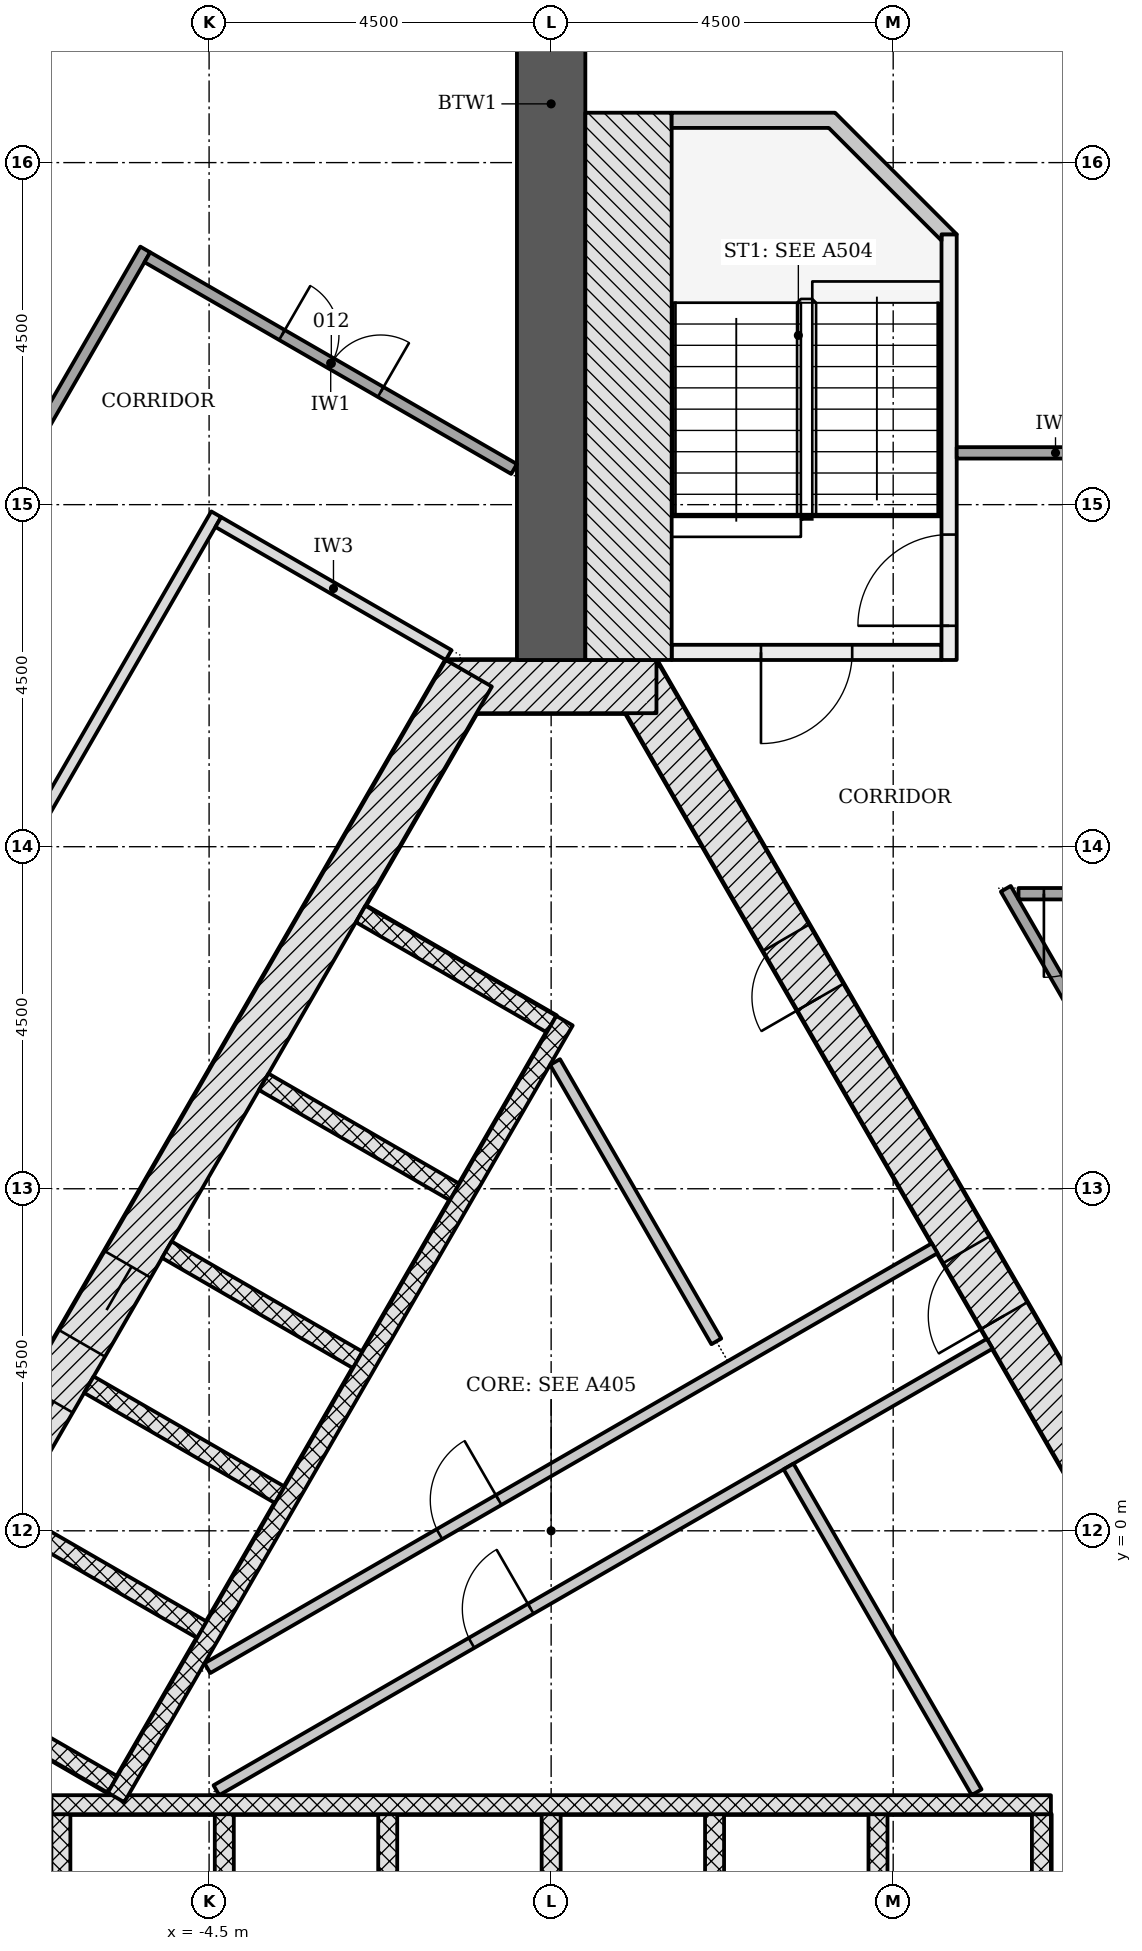
"""IFC4 building model, lengths in metres.
Left out: names, types, materials, properties, quantities, classifications, styles, units other than length and angle.
Written with IfcOpenShell. Run it as: python <this file> out.ifc"""

import sys

from ifc_helpers import new_model, si_unit, direction, frame, frame_2d, origin, place, context, subcontext, project, spatial, polyline, rectangle, outline, extrude, element, fill, save


model = new_model("IFC4")
c1 = context("Model", 3, precision=1e-05, world=origin(), true_north=direction((0.0, 1.0)))
c2 = subcontext(c1, "Body", "Model", "MODEL_VIEW")
j1 = project(units=[si_unit("LENGTHUNIT", "METRE"), si_unit("PLANEANGLEUNIT", "RADIAN")], contexts=[c1])
p1 = place(None, origin())
s1 = spatial("IfcSite", under=j1, at=p1, CompositionType="ELEMENT")
p2 = place(p1, origin())
s2 = spatial("IfcBuilding", under=s1, at=p2, CompositionType="ELEMENT")
p3 = place(p2, frame((0.0, 0.0, 27.6)))
s3 = spatial("IfcBuildingStorey", under=s2, at=p3, CompositionType="ELEMENT", Elevation=27.6)
p4 = place(p3, frame((10.311, -4.703, -0.2), z_axis=(0.0, 0.0, 1.0), x_axis=(-0.500001446645, 0.866024568562, 0.0)))
e1 = element("IfcWall", 1, at=p4, inside=s3, PredefinedType="SHEAR", context=c2, shape_type="SweptSolid", body=[
    extrude(rectangle(XDim=18.458, YDim=0.7, at=frame_2d((9.229, 0.0))), origin(), (0.0, 0.0, 1.0), 3.6),
])
p5 = place(p4, frame((8.7, 0.0, 0.2)))
e2 = element("IfcOpeningElement", 2, at=p5, cuts=e1, PredefinedType="OPENING", context=c2, shape_type="SweptSolid", body=[
    extrude(rectangle(XDim=1.0, YDim=2.1, at=frame_2d((0.5, 1.05))), frame((0.0, 0.36, 0.0), z_axis=(0.0, -1.0, 0.0), x_axis=(1.0, 0.0, 0.0)), (0.0, 0.0, 1.0), 0.72),
])
p6 = place(p4, frame((3.99, 0.0, 0.2)))
e3 = element("IfcOpeningElement", 3, at=p6, cuts=e1, PredefinedType="OPENING", context=c2, shape_type="SweptSolid", body=[
    extrude(rectangle(XDim=0.9, YDim=2.1, at=frame_2d((0.45, 1.05))), frame((0.0, 0.36, 0.0), z_axis=(0.0, -1.0, 0.0), x_axis=(1.0, 0.0, 0.0)), (0.0, 0.0, 1.0), 0.72),
])
p7 = place(p4, frame((13.539, 0.0, 0.2)))
e4 = element("IfcOpeningElement", 4, at=p7, cuts=e1, PredefinedType="OPENING", context=c2, shape_type="SweptSolid", body=[
    extrude(rectangle(XDim=0.9, YDim=2.1, at=frame_2d((0.45, 1.05))), frame((0.0, 0.36, 0.0), z_axis=(0.0, -1.0, 0.0), x_axis=(1.0, 0.0, 0.0)), (0.0, 0.0, 1.0), 0.72),
])
p8 = place(p3, frame((1.386, 11.106, -0.2), z_axis=(0.0, 0.0, 1.0), x_axis=(-1.0, 0.0, 0.0)))
e5 = element("IfcWall", 5, at=p8, inside=s3, PredefinedType="SHEAR", context=c2, shape_type="SweptSolid", body=[
    extrude(rectangle(XDim=2.771, YDim=0.7, at=frame_2d((1.386, 0.0))), origin(), (0.0, 0.0, 1.0), 3.6),
])
p9 = place(p3, frame((-1.083, 11.281, -0.2), z_axis=(0.0, 0.0, 1.0), x_axis=(-0.500001446645, -0.866024568562, 0.0)))
e6 = element("IfcWall", 6, at=p9, inside=s3, PredefinedType="SHEAR", context=c2, shape_type="SweptSolid", body=[
    extrude(rectangle(XDim=18.458, YDim=0.7, at=frame_2d((9.229, 0.0))), origin(), (0.0, 0.0, 1.0), 3.6),
])
p10 = place(p9, frame((8.979, 0.0, 0.2)))
e7 = element("IfcOpeningElement", 7, at=p10, cuts=e6, PredefinedType="OPENING", context=c2, shape_type="SweptSolid", body=[
    extrude(rectangle(XDim=1.2, YDim=2.1, at=frame_2d((0.6, 1.05))), frame((0.0, 0.36, 0.0), z_axis=(0.0, -1.0, 0.0), x_axis=(1.0, 0.0, 0.0)), (0.0, 0.0, 1.0), 0.72),
])
p11 = place(p9, frame((11.029, 0.0, 0.2)))
e8 = element("IfcOpeningElement", 8, at=p11, cuts=e6, PredefinedType="OPENING", context=c2, shape_type="SweptSolid", body=[
    extrude(rectangle(XDim=1.2, YDim=2.1, at=frame_2d((0.6, 1.05))), frame((0.0, 0.36, 0.0), z_axis=(0.0, -1.0, 0.0), x_axis=(1.0, 0.0, 0.0)), (0.0, 0.0, 1.0), 0.72),
])
p12 = place(p3, frame((0.0, 11.456, -0.2), z_axis=(0.0, 0.0, 1.0), x_axis=(0.0, 1.0, 0.0)))
e9 = element("IfcWall", 9, at=p12, inside=s3, PredefinedType="SHEAR", context=c2, shape_type="SweptSolid", body=[
    extrude(rectangle(XDim=14.633, YDim=0.9, at=frame_2d((7.316, 0.0))), origin(), (0.0, 0.0, 1.0), 3.6),
])
for number, where, z_axis, x_axis in (
    (10, (-6.45, -6.228, -0.2), (0.0, 0.0, 1.0), (0.0, 1.0, 0.0)),
    (11, (-4.3, -6.228, -0.2), (0.0, 0.0, 1.0), (0.0, 1.0, 0.0)),
    (12, (-2.15, -6.228, -0.2), (0.0, 0.0, 1.0), (0.0, 1.0, 0.0)),
    (13, (0.0, -6.228, -0.2), (0.0, 0.0, 1.0), (0.0, 1.0, 0.0)),
    (14, (2.15, -6.228, -0.2), (0.0, 0.0, 1.0), (0.0, 1.0, 0.0)),
    (15, (4.3, -6.228, -0.2), (0.0, 0.0, 1.0), (0.0, 1.0, 0.0)),
    (16, (6.45, -6.228, -0.2), (0.0, 0.0, 1.0), (0.0, 1.0, 0.0)),
):
    element("IfcWall", number, at=place(p3, frame(where, z_axis=z_axis, x_axis=x_axis)), inside=s3, PredefinedType="PARTITIONING", context=c2, shape_type="SweptSolid", body=[
        extrude(rectangle(XDim=2.5, YDim=0.25, at=frame_2d((1.25, 0.0))), origin(), (0.0, 0.0, 1.0), 3.6),
    ])
p13 = place(p3, frame((-6.575, -3.603, 0.0), z_axis=(0.0, 0.0, 1.0), x_axis=(1.0, 0.0, 0.0)))
e17 = element("IfcWall", 17, at=p13, inside=s3, PredefinedType="PARTITIONING", context=c2, shape_type="SweptSolid", body=[
    extrude(rectangle(XDim=13.15, YDim=0.25, at=frame_2d((6.575, 0.0))), origin(), (0.0, 0.0, 1.0), 3.4),
])
p14 = place(p3, frame((-2.506, 8.115, -0.2), z_axis=(0.0, 0.0, 1.0), x_axis=(0.865996321171, -0.50005036918, 0.0)))
e18 = element("IfcWall", 18, at=p14, inside=s3, PredefinedType="PARTITIONING", context=c2, shape_type="SweptSolid", body=[
    extrude(rectangle(XDim=2.9, YDim=0.25, at=frame_2d((1.45, 0.0))), origin(), (0.0, 0.0, 1.0), 3.6),
])
for number, where, z_axis, x_axis in (
    (19, (-3.781, 5.907, -0.2), (0.0, 0.0, 1.0), (0.866, -0.5, 0.0)),
    (20, (-5.056, 3.699, -0.2), (0.0, 0.0, 1.0), (0.866, -0.5, 0.0)),
    (21, (-6.081, 1.923, -0.2), (0.0, 0.0, 1.0), (0.866, -0.5, 0.0)),
    (22, (-7.106, 0.148, -0.2), (0.0, 0.0, 1.0), (0.866, -0.5, 0.0)),
    (23, (-8.281, -1.887, -0.2), (0.0, 0.0, 1.0), (0.866, -0.5, 0.0)),
):
    element("IfcWall", number, at=place(p3, frame(where, z_axis=z_axis, x_axis=x_axis)), inside=s3, PredefinedType="PARTITIONING", context=c2, shape_type="SweptSolid", body=[
        extrude(rectangle(XDim=2.9, YDim=0.25, at=frame_2d((1.45, 0.0))), origin(), (0.0, 0.0, 1.0), 3.6),
    ])
p15 = place(p3, frame((0.176, 6.711, 0.0), z_axis=(0.0, 0.0, 1.0), x_axis=(-0.500004227369, -0.866022963098, 0.0)))
e24 = element("IfcWall", 24, at=p15, inside=s3, PredefinedType="PARTITIONING", context=c2, shape_type="SweptSolid", body=[
    extrude(rectangle(XDim=11.8, YDim=0.25, at=frame_2d((5.9, 0.0))), origin(), (0.0, 0.0, 1.0), 3.4),
])
p16 = place(p3, frame((-4.523, -1.807, 0.0), z_axis=(0.0, 0.0, 1.0), x_axis=(0.866030300338, 0.499991518824, 0.0)))
e25 = element("IfcWall", 25, at=p16, inside=s3, PredefinedType="PARTITIONING", context=c2, shape_type="SweptSolid", body=[
    extrude(rectangle(XDim=11.049, YDim=0.15, at=frame_2d((5.524, 0.0))), origin(), (0.0, 0.0, 1.0), 3.4),
])
p17 = place(p16, frame((3.525, 0.0, 0.0)))
e26 = element("IfcOpeningElement", 26, at=p17, cuts=e25, PredefinedType="OPENING", context=c2, shape_type="SweptSolid", body=[
    extrude(rectangle(XDim=0.9, YDim=2.1, at=frame_2d((0.45, 1.05))), frame((0.0, 0.085, 0.0), z_axis=(0.0, -1.0, 0.0), x_axis=(1.0, 0.0, 0.0)), (0.0, 0.0, 1.0), 0.17),
])
p18 = place(p3, frame((-4.404, -3.413, 0.0), z_axis=(0.0, 0.0, 1.0), x_axis=(0.866022252853, 0.500005457533, 0.0)))
e27 = element("IfcWall", 27, at=p18, inside=s3, PredefinedType="PARTITIONING", context=c2, shape_type="SweptSolid", body=[
    extrude(rectangle(XDim=11.749, YDim=0.15, at=frame_2d((5.875, 0.0))), origin(), (0.0, 0.0, 1.0), 3.4),
])
p19 = place(p18, frame((3.875, 0.0, 0.0)))
e28 = element("IfcOpeningElement", 28, at=p19, cuts=e27, PredefinedType="OPENING", context=c2, shape_type="SweptSolid", body=[
    extrude(rectangle(XDim=0.9, YDim=2.1, at=frame_2d((0.45, 1.05))), frame((0.0, 0.085, 0.0), z_axis=(0.0, -1.0, 0.0), x_axis=(1.0, 0.0, 0.0)), (0.0, 0.0, 1.0), 0.17),
])
p20 = place(p3, frame((2.174, 2.492, 0.0), z_axis=(0.0, 0.0, 1.0), x_axis=(-0.499999641798, 0.866025610592, 0.0)))
e29 = element("IfcWall", 29, at=p20, inside=s3, PredefinedType="PARTITIONING", context=c2, shape_type="SweptSolid", body=[
    extrude(rectangle(XDim=4.244, YDim=0.15, at=frame_2d((2.122, 0.0))), origin(), (0.0, 0.0, 1.0), 3.4),
])
p21 = place(p3, frame((5.598, -3.439, 0.0), z_axis=(0.0, 0.0, 1.0), x_axis=(-0.500007155043, 0.866021272779, 0.0)))
e30 = element("IfcWall", 30, at=p21, inside=s3, PredefinedType="PARTITIONING", context=c2, shape_type="SweptSolid", body=[
    extrude(rectangle(XDim=4.949, YDim=0.15, at=frame_2d((2.474, 0.0))), origin(), (0.0, 0.0, 1.0), 3.4),
])
p22 = place(p3, frame((5.135, 11.556, -0.2), z_axis=(0.0, 0.0, 1.0), x_axis=(-1.0, 0.0, 0.0)))
e31 = element("IfcWall", 31, at=p22, inside=s3, PredefinedType="SHEAR", context=c2, shape_type="SweptSolid", body=[
    extrude(rectangle(XDim=3.55, YDim=0.2, at=frame_2d((1.775, 0.0))), origin(), (0.0, 0.0, 1.0), 3.6),
])
p23 = place(p22, frame((1.175, 0.0, 0.2)))
e32 = element("IfcOpeningElement", 32, at=p23, cuts=e31, PredefinedType="OPENING", context=c2, shape_type="SweptSolid", body=[
    extrude(rectangle(XDim=1.2, YDim=2.1, at=frame_2d((0.6, 1.05))), frame((0.0, 0.11, 0.0), z_axis=(0.0, -1.0, 0.0), x_axis=(1.0, 0.0, 0.0)), (0.0, 0.0, 1.0), 0.22),
])
p24 = place(p3, frame((5.236, 11.456, -0.2), z_axis=(0.0, 0.0, 1.0), x_axis=(0.0, 1.0, 0.0)))
e33 = element("IfcWall", 33, at=p24, inside=s3, PredefinedType="SHEAR", context=c2, shape_type="SweptSolid", body=[
    extrude(rectangle(XDim=5.6, YDim=0.2, at=frame_2d((2.8, 0.0))), origin(), (0.0, 0.0, 1.0), 3.6),
])
p25 = place(p24, frame((0.45, 0.0, 0.2)))
e34 = element("IfcOpeningElement", 34, at=p25, cuts=e33, PredefinedType="OPENING", context=c2, shape_type="SweptSolid", body=[
    extrude(rectangle(XDim=1.2, YDim=2.1, at=frame_2d((0.6, 1.05))), frame((0.0, 0.11, 0.0), z_axis=(0.0, -1.0, 0.0), x_axis=(1.0, 0.0, 0.0)), (0.0, 0.0, 1.0), 0.22),
])
p26 = place(p3, frame((1.018, 11.456, -0.2), z_axis=(0.0, 0.0, 1.0), x_axis=(0.0, 1.0, 0.0)))
e35 = element("IfcWall", 35, at=p26, inside=s3, PredefinedType="SHEAR", context=c2, shape_type="SweptSolid", body=[
    extrude(rectangle(XDim=7.2, YDim=1.136, at=frame_2d((3.6, 0.0))), origin(), (0.0, 0.0, 1.0), 3.6),
])
p27 = place(p3, frame((0.0, 0.0, -0.2)))
e36 = element("IfcWall", 36, at=p27, inside=s3, PredefinedType="SHEAR", context=c2, shape_type="SweptSolid", body=[
    extrude(outline(polyline([(5.336, 17.056), (3.736, 18.656), (1.586, 18.656), (1.586, 18.456), (3.653, 18.456), (5.135, 16.974), (5.135, 17.056), (5.135, 17.056), (5.135, 17.056), (5.135, 17.056), (5.135, 17.056), (5.135, 17.056), (5.135, 17.056), (5.135, 17.056), (5.135, 17.056), (5.135, 17.056), (5.135, 17.056), (5.135, 17.056), (5.135, 17.056), (5.135, 17.056), (5.135, 17.056), (5.135, 17.056), (5.135, 17.056), (5.336, 17.056)])), origin(), (0.0, 0.0, 1.0), 3.6),
])
p28 = place(p3, frame((-17.208, -3.699, 0.0), z_axis=(0.0, 0.0, 1.0), x_axis=(0.499997567621, 0.866026808115, 0.0)))
e37 = element("IfcWall", 37, at=p28, inside=s3, PredefinedType="PARTITIONING", context=c2, shape_type="SweptSolid", body=[
    extrude(rectangle(XDim=23.736, YDim=0.15, at=frame_2d((11.868, 0.0))), origin(), (0.0, 0.0, 1.0), 2.768),
])
p29 = place(p28, frame((16.656, 0.0, 0.0)))
e38 = element("IfcOpeningElement", 38, at=p29, cuts=e37, PredefinedType="OPENING", context=c2, shape_type="SweptSolid", body=[
    extrude(rectangle(XDim=1.1, YDim=2.1, at=frame_2d((0.55, 1.05))), frame((0.0, 0.085, 0.0), z_axis=(0.0, -1.0, 0.0), x_axis=(1.0, 0.0, 0.0)), (0.0, 0.0, 1.0), 0.17),
])
p30 = place(p28, frame((14.662, 0.0, 0.0)))
e39 = element("IfcOpeningElement", 39, at=p30, cuts=e37, PredefinedType="OPENING", context=c2, shape_type="SweptSolid", body=[
    extrude(rectangle(XDim=1.1, YDim=2.1, at=frame_2d((0.55, 1.05))), frame((0.0, 0.085, 0.0), z_axis=(0.0, -1.0, 0.0), x_axis=(1.0, 0.0, 0.0)), (0.0, 0.0, 1.0), 0.17),
])
p31 = place(p28, frame((5.273, 0.0, 0.0)))
e40 = element("IfcOpeningElement", 40, at=p31, cuts=e37, PredefinedType="OPENING", context=c2, shape_type="SweptSolid", body=[
    extrude(rectangle(XDim=1.0, YDim=2.1, at=frame_2d((0.5, 1.05))), frame((0.0, 0.085, 0.0), z_axis=(0.0, -1.0, 0.0), x_axis=(1.0, 0.0, 0.0)), (0.0, 0.0, 1.0), 0.17),
])
p32 = place(p3, frame((-4.407, 13.374, 0.0), z_axis=(0.0, 0.0, 1.0), x_axis=(-0.499997181693, -0.866027030928, 0.0)))
e41 = element("IfcWall", 41, at=p32, inside=s3, PredefinedType="PARTITIONING", context=c2, shape_type="SweptSolid", body=[
    extrude(rectangle(XDim=16.77, YDim=0.15, at=frame_2d((8.385, 0.0))), origin(), (0.0, 0.0, 1.0), 2.768),
])
p33 = place(p32, frame((8.879, 0.0, 0.0)))
e42 = element("IfcOpeningElement", 42, at=p33, cuts=e41, PredefinedType="OPENING", context=c2, shape_type="SweptSolid", body=[
    extrude(rectangle(XDim=1.0, YDim=2.1, at=frame_2d((0.5, 1.05))), frame((0.0, 0.085, 0.0), z_axis=(0.0, -1.0, 0.0), x_axis=(1.0, 0.0, 0.0)), (0.0, 0.0, 1.0), 0.17),
])
p34 = place(p3, frame((5.981, 8.446, 0.0), z_axis=(0.0, 0.0, 1.0), x_axis=(0.499996620721, -0.866027354803, 0.0)))
e43 = element("IfcWall", 43, at=p34, inside=s3, PredefinedType="PARTITIONING", context=c2, shape_type="SweptSolid", body=[
    extrude(rectangle(XDim=15.057, YDim=0.15, at=frame_2d((7.528, 0.0))), origin(), (0.0, 0.0, 1.0), 2.768),
])
p35 = place(p34, frame((9.087, 0.0, 0.0)))
e44 = element("IfcOpeningElement", 44, at=p35, cuts=e43, PredefinedType="OPENING", context=c2, shape_type="SweptSolid", body=[
    extrude(rectangle(XDim=1.1, YDim=2.1, at=frame_2d((0.55, 1.05))), frame((0.0, 0.085, 0.0), z_axis=(0.0, -1.0, 0.0), x_axis=(1.0, 0.0, 0.0)), (0.0, 0.0, 1.0), 0.17),
])
p36 = place(p34, frame((7.128, 0.0, 0.0)))
e45 = element("IfcOpeningElement", 45, at=p36, cuts=e43, PredefinedType="OPENING", context=c2, shape_type="SweptSolid", body=[
    extrude(rectangle(XDim=1.1, YDim=2.1, at=frame_2d((0.55, 1.05))), frame((0.0, 0.085, 0.0), z_axis=(0.0, -1.0, 0.0), x_axis=(1.0, 0.0, 0.0)), (0.0, 0.0, 1.0), 0.17),
])
p37 = place(p3, frame((-5.312, 16.755, 0.0), z_axis=(0.0, 0.0, 1.0), x_axis=(0.866028693448, -0.499994302092, 0.0)))
e46 = element("IfcWall", 46, at=p37, inside=s3, PredefinedType="PARTITIONING", context=c2, shape_type="SweptSolid", body=[
    extrude(rectangle(XDim=5.571, YDim=0.15, at=frame_2d((2.786, 0.0))), origin(), (0.0, 0.0, 1.0), 3.4),
])
p38 = place(p37, frame((2.045, 0.0, 0.0)))
e47 = element("IfcOpeningElement", 47, at=p38, cuts=e46, PredefinedType="OPENING", context=c2, shape_type="SweptSolid", body=[
    extrude(rectangle(XDim=1.5, YDim=2.1, at=frame_2d((0.75, 1.05))), frame((0.0, 0.085, 0.0), z_axis=(0.0, -1.0, 0.0), x_axis=(1.0, 0.0, 0.0)), (0.0, 0.0, 1.0), 0.17),
])
p39 = place(p3, frame((-4.379, 13.271, 0.0), z_axis=(0.0, 0.0, 1.0), x_axis=(0.866019471182, -0.500010275428, 0.0)))
e48 = element("IfcWall", 48, at=p39, inside=s3, PredefinedType="PARTITIONING", context=c2, shape_type="SweptSolid", body=[
    extrude(rectangle(XDim=3.5, YDim=0.15, at=frame_2d((1.75, 0.0))), origin(), (0.0, 0.0, 1.0), 3.4),
])
p40 = place(p3, frame((5.336, 14.181, 0.0), z_axis=(0.0, 0.0, 1.0), x_axis=(1.0, 0.0, 0.0)))
e49 = element("IfcWall", 49, at=p40, inside=s3, PredefinedType="PARTITIONING", context=c2, shape_type="SweptSolid", body=[
    extrude(rectangle(XDim=2.6, YDim=0.15, at=frame_2d((1.3, 0.0))), origin(), (0.0, 0.0, 1.0), 2.923),
])
p41 = place(p3, frame((7.936, 8.381, 0.0), z_axis=(0.0, 0.0, 1.0), x_axis=(-1.0, 0.0, 0.0)))
e50 = element("IfcWall", 50, at=p41, inside=s3, PredefinedType="PARTITIONING", context=c2, shape_type="SweptSolid", body=[
    extrude(rectangle(XDim=1.787, YDim=0.15, at=frame_2d((0.894, 0.0))), origin(), (0.0, 0.0, 1.0), 2.768),
])
p42 = place(p41, frame((0.353, 0.0, 0.0)))
e51 = element("IfcOpeningElement", 51, at=p42, cuts=e50, PredefinedType="OPENING", context=c2, shape_type="SweptSolid", body=[
    extrude(rectangle(XDim=1.1, YDim=2.1, at=frame_2d((0.55, 1.05))), frame((0.0, 0.085, 0.0), z_axis=(0.0, -1.0, 0.0), x_axis=(1.0, 0.0, 0.0)), (0.0, 0.0, 1.0), 0.17),
])
p43 = place(p10, origin())
e52 = element("IfcDoor", 52, at=p43, inside=s3, OperationType="DOUBLE_DOOR_SLIDING", PredefinedType="DOOR", context=c2, shape_type="SweptSolid", body=[
    extrude(rectangle(XDim=1.2, YDim=2.1, at=frame_2d((0.6, 1.05))), frame((0.0, 0.025, 0.0), z_axis=(0.0, -1.0, 0.0), x_axis=(1.0, 0.0, 0.0)), (0.0, 0.0, 1.0), 0.05),
])
fill(e7, e52)
p44 = place(p5, origin())
e53 = element("IfcDoor", 53, at=p44, inside=s3, OperationType="SINGLE_SWING_LEFT", PredefinedType="DOOR", context=c2, shape_type="SweptSolid", body=[
    extrude(rectangle(XDim=1.0, YDim=2.1, at=frame_2d((0.5, 1.05))), frame((0.0, 0.075, 0.0), z_axis=(0.0, -1.0, 0.0), x_axis=(1.0, 0.0, 0.0)), (0.0, 0.0, 1.0), 0.15),
])
fill(e2, e53)
p45 = place(p7, origin())
e54 = element("IfcDoor", 54, at=p45, inside=s3, OperationType="SINGLE_SWING_LEFT", PredefinedType="DOOR", context=c2, shape_type="SweptSolid", body=[
    extrude(rectangle(XDim=0.9, YDim=2.1, at=frame_2d((0.45, 1.05))), frame((0.0, 0.075, 0.0), z_axis=(0.0, -1.0, 0.0), x_axis=(1.0, 0.0, 0.0)), (0.0, 0.0, 1.0), 0.15),
])
fill(e4, e54)
p46 = place(p19, origin())
e55 = element("IfcDoor", 55, at=p46, inside=s3, OperationType="SINGLE_SWING_RIGHT", PredefinedType="DOOR", context=c2, shape_type="SweptSolid", body=[
    extrude(rectangle(XDim=0.9, YDim=2.1, at=frame_2d((0.45, 1.05))), frame((0.0, 0.025, 0.0), z_axis=(0.0, -1.0, 0.0), x_axis=(1.0, 0.0, 0.0)), (0.0, 0.0, 1.0), 0.05),
])
fill(e28, e55)
p47 = place(p17, origin())
e56 = element("IfcDoor", 56, at=p47, inside=s3, OperationType="SINGLE_SWING_RIGHT", PredefinedType="DOOR", context=c2, shape_type="SweptSolid", body=[
    extrude(rectangle(XDim=0.9, YDim=2.1, at=frame_2d((0.45, 1.05))), frame((0.0, 0.025, 0.0), z_axis=(0.0, -1.0, 0.0), x_axis=(1.0, 0.0, 0.0)), (0.0, 0.0, 1.0), 0.05),
])
fill(e26, e56)
p48 = place(p23, origin())
e57 = element("IfcDoor", 57, at=p48, inside=s3, OperationType="SINGLE_SWING_RIGHT", PredefinedType="DOOR", context=c2, shape_type="SweptSolid", body=[
    extrude(rectangle(XDim=1.2, YDim=2.1, at=frame_2d((0.6, 1.05))), frame((0.0, 0.025, 0.0), z_axis=(0.0, -1.0, 0.0), x_axis=(1.0, 0.0, 0.0)), (0.0, 0.0, 1.0), 0.05),
])
fill(e32, e57)
p49 = place(p25, origin())
e58 = element("IfcDoor", 58, at=p49, inside=s3, OperationType="SINGLE_SWING_LEFT", PredefinedType="DOOR", context=c2, shape_type="SweptSolid", body=[
    extrude(rectangle(XDim=1.2, YDim=2.1, at=frame_2d((0.6, 1.05))), frame((0.0, 0.025, 0.0), z_axis=(0.0, -1.0, 0.0), x_axis=(1.0, 0.0, 0.0)), (0.0, 0.0, 1.0), 0.05),
])
fill(e34, e58)
p50 = place(p38, origin())
e59 = element("IfcDoor", 59, at=p50, inside=s3, OperationType="DOUBLE_DOOR_SINGLE_SWING", PredefinedType="DOOR", context=c2, shape_type="SweptSolid", body=[
    extrude(rectangle(XDim=1.5, YDim=2.1, at=frame_2d((0.75, 1.05))), frame((0.0, 0.025, 0.0), z_axis=(0.0, -1.0, 0.0), x_axis=(1.0, 0.0, 0.0)), (0.0, 0.0, 1.0), 0.05),
])
fill(e47, e59)
p51 = place(p42, origin())
e60 = element("IfcDoor", 60, at=p51, inside=s3, OperationType="SINGLE_SWING_RIGHT", PredefinedType="DOOR", context=c2, shape_type="SweptSolid", body=[
    extrude(rectangle(XDim=1.1, YDim=2.1, at=frame_2d((0.55, 1.05))), frame((0.0, 0.025, 0.0), z_axis=(0.0, -1.0, 0.0), x_axis=(1.0, 0.0, 0.0)), (0.0, 0.0, 1.0), 0.05),
])
fill(e51, e60)
save(model, sys.argv[1])
